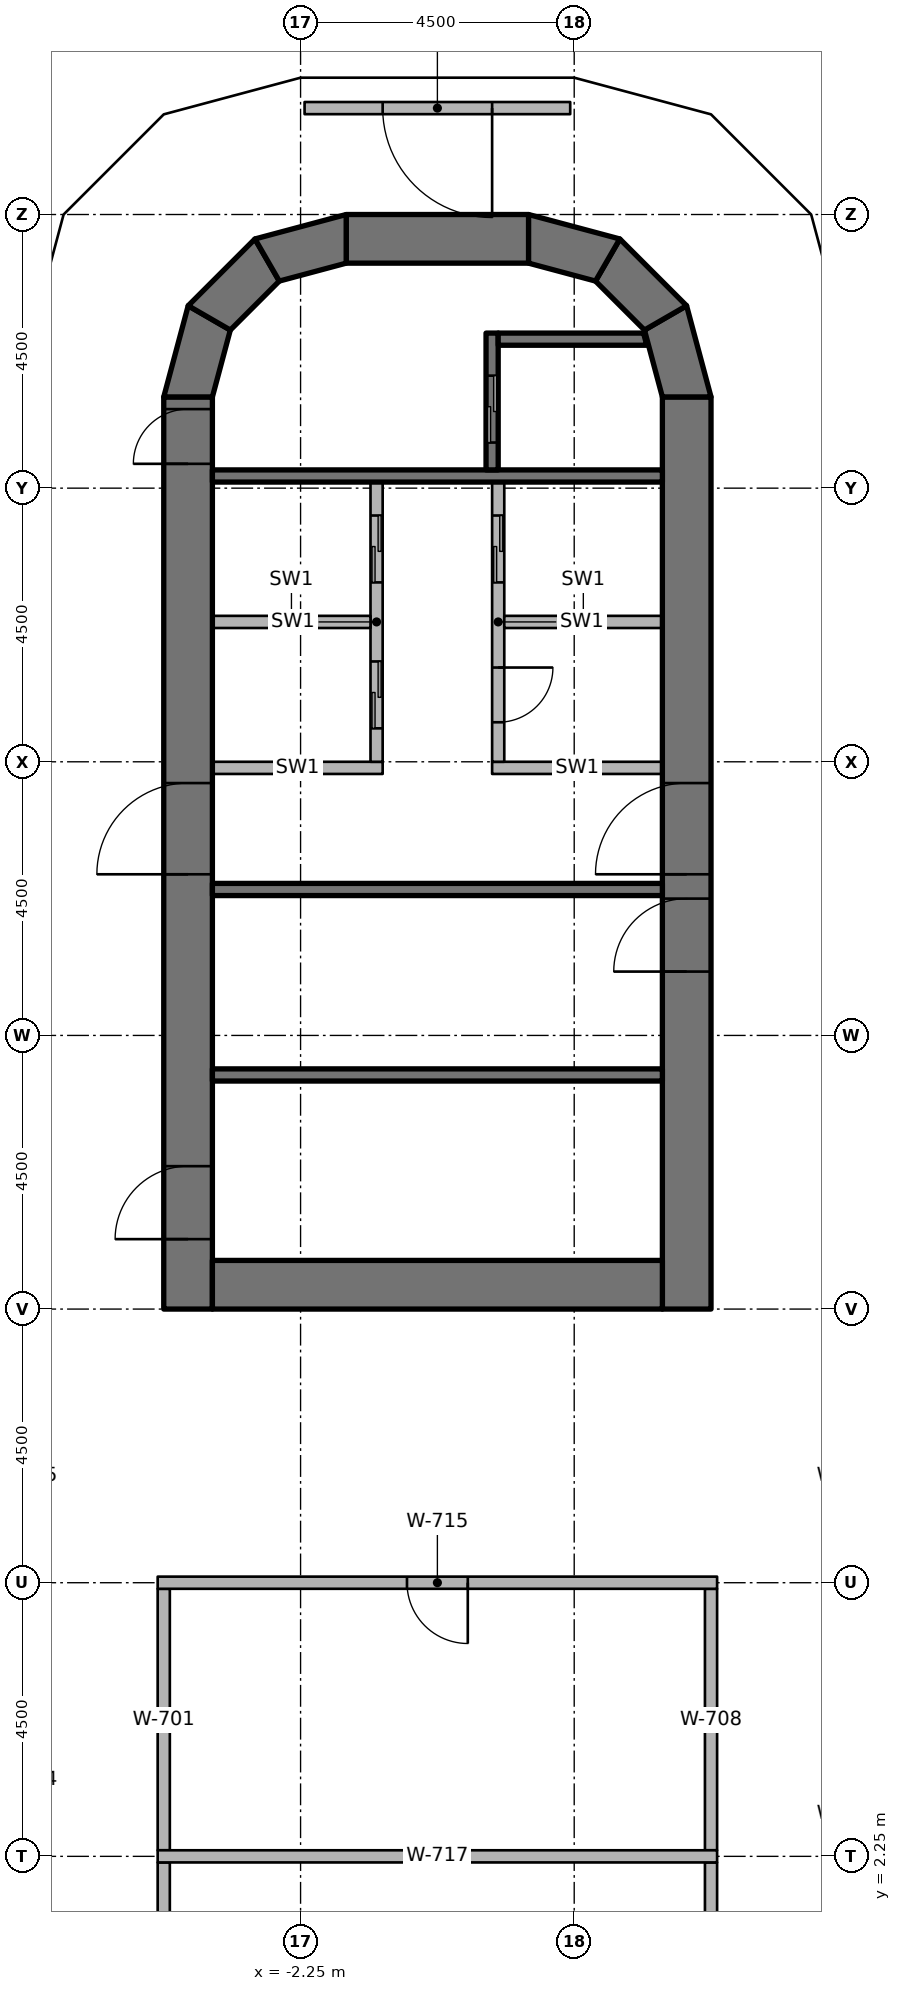
"""IFC4 building model, lengths in metres.
Left out: names, types, materials, properties, quantities, classifications, styles, units other than length and angle.
Written with IfcOpenShell. Run it as: python <this file> out.ifc"""

import sys

from ifc_helpers import new_model, si_unit, direction, frame, frame_2d, origin, origin_2d, place, context, subcontext, project, spatial, polyline, rectangle, outline, extrude, element, fill, save


model = new_model("IFC4")
c1 = context("Model", 3, precision=1e-05, world=origin(), true_north=direction((0.0, 1.0)))
c2 = subcontext(c1, "Body", "Model", "MODEL_VIEW")
j1 = project(units=[si_unit("LENGTHUNIT", "METRE"), si_unit("PLANEANGLEUNIT", "RADIAN")], contexts=[c1])
p1 = place(None, origin())
s1 = spatial("IfcSite", under=j1, at=p1, CompositionType="ELEMENT")
p2 = place(p1, origin())
s2 = spatial("IfcBuilding", under=s1, at=p2, CompositionType="ELEMENT")
p3 = place(p2, frame((0.0, 0.0, 94.2)))
s3 = spatial("IfcBuildingStorey", under=s2, at=p3, CompositionType="ELEMENT", Elevation=94.2)
for number, where, z_axis, x_axis in (
    (1, (-6.25, 6.25, 0.0), (0.0, 0.0, 1.0), (1.0, 0.0, 0.0)),
    (2, (-6.25, 10.75, 0.0), (0.0, 0.0, 1.0), (1.0, 0.0, 0.0)),
    (3, (-6.25, 15.75, 0.0), (0.0, 0.0, 1.0), (1.0, 0.0, 0.0)),
    (4, (-6.25, 20.25, 0.0), (0.0, 0.0, 1.0), (1.0, 0.0, 0.0)),
    (5, (-6.25, 24.65, 0.0), (0.0, 0.0, 1.0), (1.0, 0.0, 0.0)),
    (6, (-6.25, 26.7, 0.0), (0.0, 0.0, 1.0), (1.0, 0.0, 0.0)),
    (7, (6.25, 6.25, 0.0), (0.0, 0.0, 1.0), (1.0, 0.0, 0.0)),
    (8, (6.25, 10.75, 0.0), (0.0, 0.0, 1.0), (1.0, 0.0, 0.0)),
    (9, (6.25, 15.75, 0.0), (0.0, 0.0, 1.0), (1.0, 0.0, 0.0)),
    (10, (6.25, 20.25, 0.0), (0.0, 0.0, 1.0), (1.0, 0.0, 0.0)),
    (11, (6.25, 24.65, 0.0), (0.0, 0.0, 1.0), (1.0, 0.0, 0.0)),
    (12, (6.25, 26.7, 0.0), (0.0, 0.0, 1.0), (1.0, 0.0, 0.0)),
):
    element("IfcColumn", number, at=place(p3, frame(where, z_axis=z_axis, x_axis=x_axis)), inside=s3, PredefinedType="COLUMN", context=c2, shape_type="SweptSolid", body=[
        extrude(rectangle(XDim=0.9, YDim=0.9, at=origin_2d()), origin(), (0.0, 0.0, 1.0), 3.65),
    ])
p4 = place(p3, frame((-4.1, 11.25, 0.0), z_axis=(0.0, 0.0, 1.0), x_axis=(0.0, 1.0, 0.0)))
e13 = element("IfcWall", 13, at=p4, inside=s3, PredefinedType="SHEAR", context=c2, shape_type="SweptSolid", body=[
    extrude(rectangle(XDim=15.0, YDim=0.8, at=frame_2d((7.5, 0.0))), origin(), (0.0, 0.0, 1.0), 3.8),
])
p5 = place(p4, frame((7.15, 0.0, 0.0)))
e14 = element("IfcOpeningElement", 14, at=p5, cuts=e13, PredefinedType="OPENING", context=c2, shape_type="SweptSolid", body=[
    extrude(rectangle(XDim=1.5, YDim=2.3, at=frame_2d((0.75, 1.15))), frame((0.0, 0.41, 0.0), z_axis=(0.0, -1.0, 0.0), x_axis=(1.0, 0.0, 0.0)), (0.0, 0.0, 1.0), 0.82),
])
p6 = place(p4, frame((13.9, 0.0, 0.0)))
e15 = element("IfcOpeningElement", 15, at=p6, cuts=e13, PredefinedType="OPENING", context=c2, shape_type="SweptSolid", body=[
    extrude(rectangle(XDim=0.9, YDim=2.1, at=frame_2d((0.45, 1.05))), frame((0.0, 0.41, 0.0), z_axis=(0.0, -1.0, 0.0), x_axis=(1.0, 0.0, 0.0)), (0.0, 0.0, 1.0), 0.82),
])
p7 = place(p4, frame((1.15, 0.0, 0.0)))
e16 = element("IfcOpeningElement", 16, at=p7, cuts=e13, PredefinedType="OPENING", context=c2, shape_type="SweptSolid", body=[
    extrude(rectangle(XDim=1.2, YDim=2.1, at=frame_2d((0.6, 1.05))), frame((0.0, 0.41, 0.0), z_axis=(0.0, -1.0, 0.0), x_axis=(1.0, 0.0, 0.0)), (0.0, 0.0, 1.0), 0.82),
])
p8 = place(p3, frame((4.1, 11.25, 0.0), z_axis=(0.0, 0.0, 1.0), x_axis=(0.0, 1.0, 0.0)))
e17 = element("IfcWall", 17, at=p8, inside=s3, PredefinedType="SHEAR", context=c2, shape_type="SweptSolid", body=[
    extrude(rectangle(XDim=15.0, YDim=0.8, at=frame_2d((7.5, 0.0))), origin(), (0.0, 0.0, 1.0), 3.8),
])
p9 = place(p8, frame((7.15, 0.0, 0.0)))
e18 = element("IfcOpeningElement", 18, at=p9, cuts=e17, PredefinedType="OPENING", context=c2, shape_type="SweptSolid", body=[
    extrude(rectangle(XDim=1.5, YDim=2.3, at=frame_2d((0.75, 1.15))), frame((0.0, 0.41, 0.0), z_axis=(0.0, -1.0, 0.0), x_axis=(1.0, 0.0, 0.0)), (0.0, 0.0, 1.0), 0.82),
])
p10 = place(p8, frame((5.55, 0.0, 0.0)))
e19 = element("IfcOpeningElement", 19, at=p10, cuts=e17, PredefinedType="OPENING", context=c2, shape_type="SweptSolid", body=[
    extrude(rectangle(XDim=1.2, YDim=2.1, at=frame_2d((0.6, 1.05))), frame((0.0, 0.41, 0.0), z_axis=(0.0, -1.0, 0.0), x_axis=(1.0, 0.0, 0.0)), (0.0, 0.0, 1.0), 0.82),
])
p11 = place(p3, frame((-3.7, 11.65, 0.0), z_axis=(0.0, 0.0, 1.0), x_axis=(1.0, 0.0, 0.0)))
e20 = element("IfcWall", 20, at=p11, inside=s3, PredefinedType="SHEAR", context=c2, shape_type="SweptSolid", body=[
    extrude(rectangle(XDim=7.4, YDim=0.8, at=frame_2d((3.7, 0.0))), origin(), (0.0, 0.0, 1.0), 3.8),
])
p12 = place(p3, frame((-1.5, 28.85, 0.0), z_axis=(0.0, 0.0, 1.0), x_axis=(1.0, 0.0, 0.0)))
e21 = element("IfcWall", 21, at=p12, inside=s3, PredefinedType="SHEAR", context=c2, shape_type="SweptSolid", body=[
    extrude(rectangle(XDim=3.0, YDim=0.8, at=frame_2d((1.5, 0.0))), origin(), (0.0, 0.0, 1.0), 3.8),
])
p13 = place(p3, origin())
e22 = element("IfcWall", 22, at=p13, inside=s3, PredefinedType="SHEAR", context=c2, shape_type="SweptSolid", body=[
    extrude(outline(polyline([(-4.5, 26.25), (-4.098, 27.75), (-3.405, 27.35), (-3.7, 26.25), (-4.5, 26.25)])), origin(), (0.0, 0.0, 1.0), 3.8),
])
p14 = place(p3, origin())
e23 = element("IfcWall", 23, at=p14, inside=s3, PredefinedType="SHEAR", context=c2, shape_type="SweptSolid", body=[
    extrude(outline(polyline([(-4.098, 27.75), (-3.0, 28.848), (-2.6, 28.155), (-3.405, 27.35), (-4.098, 27.75)])), origin(), (0.0, 0.0, 1.0), 3.8),
])
p15 = place(p3, origin())
e24 = element("IfcWall", 24, at=p15, inside=s3, PredefinedType="SHEAR", context=c2, shape_type="SweptSolid", body=[
    extrude(outline(polyline([(-3.0, 28.848), (-1.5, 29.25), (-1.5, 28.45), (-2.6, 28.155), (-3.0, 28.848)])), origin(), (0.0, 0.0, 1.0), 3.8),
])
p16 = place(p3, origin())
e25 = element("IfcWall", 25, at=p16, inside=s3, PredefinedType="SHEAR", context=c2, shape_type="SweptSolid", body=[
    extrude(outline(polyline([(4.5, 26.25), (4.098, 27.75), (3.405, 27.35), (3.7, 26.25), (4.5, 26.25)])), origin(), (0.0, 0.0, 1.0), 3.8),
])
p17 = place(p3, origin())
e26 = element("IfcWall", 26, at=p17, inside=s3, PredefinedType="SHEAR", context=c2, shape_type="SweptSolid", body=[
    extrude(outline(polyline([(4.098, 27.75), (3.0, 28.848), (2.6, 28.155), (3.405, 27.35), (4.098, 27.75)])), origin(), (0.0, 0.0, 1.0), 3.8),
])
p18 = place(p3, origin())
e27 = element("IfcWall", 27, at=p18, inside=s3, PredefinedType="SHEAR", context=c2, shape_type="SweptSolid", body=[
    extrude(outline(polyline([(3.0, 28.848), (1.5, 29.25), (1.5, 28.45), (2.6, 28.155), (3.0, 28.848)])), origin(), (0.0, 0.0, 1.0), 3.8),
])
p19 = place(p3, frame((2.184, 31.0, 0.0), z_axis=(0.0, 0.0, 1.0), x_axis=(-1.0, 0.0, 0.0)))
e28 = element("IfcWall", 28, at=p19, inside=s3, PredefinedType="SOLIDWALL", context=c2, shape_type="SweptSolid", body=[
    extrude(rectangle(XDim=4.368, YDim=0.2, at=frame_2d((2.184, 0.0))), origin(), (0.0, 0.0, 1.0), 2.75),
])
p20 = place(p19, frame((1.284, 0.0, 0.0)))
e29 = element("IfcOpeningElement", 29, at=p20, cuts=e28, PredefinedType="OPENING", context=c2, shape_type="SweptSolid", body=[
    extrude(rectangle(XDim=1.8, YDim=2.4, at=frame_2d((0.9, 1.2))), frame((0.0, 0.11, 0.0), z_axis=(0.0, -1.0, 0.0), x_axis=(1.0, 0.0, 0.0)), (0.0, 0.0, 1.0), 0.22),
])
p21 = place(p3, frame((-3.7, 24.95, 0.0), z_axis=(0.0, 0.0, 1.0), x_axis=(1.0, 0.0, 0.0)))
e30 = element("IfcWall", 30, at=p21, inside=s3, PredefinedType="SHEAR", context=c2, shape_type="SweptSolid", body=[
    extrude(rectangle(XDim=7.4, YDim=0.2, at=frame_2d((3.7, 0.0))), origin(), (0.0, 0.0, 1.0), 3.65),
])
p22 = place(p3, frame((0.9, 27.3, 0.0), z_axis=(0.0, 0.0, 1.0), x_axis=(0.0, -1.0, 0.0)))
e31 = element("IfcWall", 31, at=p22, inside=s3, PredefinedType="SHEAR", context=c2, shape_type="SweptSolid", body=[
    extrude(rectangle(XDim=2.25, YDim=0.2, at=frame_2d((1.125, 0.0))), origin(), (0.0, 0.0, 1.0), 3.65),
])
p23 = place(p22, frame((0.7, 0.0, 0.0)))
e32 = element("IfcOpeningElement", 32, at=p23, cuts=e31, PredefinedType="OPENING", context=c2, shape_type="SweptSolid", body=[
    extrude(rectangle(XDim=1.1, YDim=2.3, at=frame_2d((0.55, 1.15))), frame((0.0, 0.11, 0.0), z_axis=(0.0, -1.0, 0.0), x_axis=(1.0, 0.0, 0.0)), (0.0, 0.0, 1.0), 0.22),
])
p24 = place(p3, origin())
e33 = element("IfcWall", 33, at=p24, inside=s3, PredefinedType="SHEAR", context=c2, shape_type="SweptSolid", body=[
    extrude(outline(polyline([(1.0, 27.1), (3.444, 27.1), (3.39, 27.3), (1.0, 27.3), (1.0, 27.1)])), origin(), (0.0, 0.0, 1.0), 3.65),
])
for number, where, z_axis, x_axis in (
    (34, (-3.7, 18.15, 0.0), (0.0, 0.0, 1.0), (1.0, 0.0, 0.0)),
    (35, (-3.7, 15.1, 0.0), (0.0, 0.0, 1.0), (1.0, 0.0, 0.0)),
):
    element("IfcWall", number, at=place(p3, frame(where, z_axis=z_axis, x_axis=x_axis)), inside=s3, PredefinedType="SHEAR", context=c2, shape_type="SweptSolid", body=[
        extrude(rectangle(XDim=7.4, YDim=0.2, at=frame_2d((3.7, 0.0))), origin(), (0.0, 0.0, 1.0), 3.65),
    ])
p25 = place(p3, frame((-3.7, 20.15, 0.0), z_axis=(0.0, 0.0, 1.0), x_axis=(1.0, 0.0, 0.0)))
e36 = element("IfcWall", 36, at=p25, inside=s3, PredefinedType="PARTITIONING", context=c2, shape_type="SweptSolid", body=[
    extrude(rectangle(XDim=2.8, YDim=0.2, at=frame_2d((1.4, 0.0))), origin(), (0.0, 0.0, 1.0), 3.65),
])
p26 = place(p3, frame((-1.0, 24.85, 0.0), z_axis=(0.0, 0.0, 1.0), x_axis=(0.0, -1.0, 0.0)))
e37 = element("IfcWall", 37, at=p26, inside=s3, PredefinedType="PARTITIONING", context=c2, shape_type="SweptSolid", body=[
    extrude(rectangle(XDim=4.6, YDim=0.2, at=frame_2d((2.3, 0.0))), origin(), (0.0, 0.0, 1.0), 3.65),
])
p27 = place(p26, frame((0.55, 0.0, 0.0)))
e38 = element("IfcOpeningElement", 38, at=p27, cuts=e37, PredefinedType="OPENING", context=c2, shape_type="SweptSolid", body=[
    extrude(rectangle(XDim=1.1, YDim=2.3, at=frame_2d((0.55, 1.15))), frame((0.0, 0.11, 0.0), z_axis=(0.0, -1.0, 0.0), x_axis=(1.0, 0.0, 0.0)), (0.0, 0.0, 1.0), 0.22),
])
p28 = place(p26, frame((2.95, 0.0, 0.0)))
e39 = element("IfcOpeningElement", 39, at=p28, cuts=e37, PredefinedType="OPENING", context=c2, shape_type="SweptSolid", body=[
    extrude(rectangle(XDim=1.1, YDim=2.3, at=frame_2d((0.55, 1.15))), frame((0.0, 0.11, 0.0), z_axis=(0.0, -1.0, 0.0), x_axis=(1.0, 0.0, 0.0)), (0.0, 0.0, 1.0), 0.22),
])
p29 = place(p3, frame((0.9, 20.15, 0.0), z_axis=(0.0, 0.0, 1.0), x_axis=(1.0, 0.0, 0.0)))
e40 = element("IfcWall", 40, at=p29, inside=s3, PredefinedType="PARTITIONING", context=c2, shape_type="SweptSolid", body=[
    extrude(rectangle(XDim=2.8, YDim=0.2, at=frame_2d((1.4, 0.0))), origin(), (0.0, 0.0, 1.0), 3.65),
])
p30 = place(p3, frame((1.0, 24.85, 0.0), z_axis=(0.0, 0.0, 1.0), x_axis=(0.0, -1.0, 0.0)))
e41 = element("IfcWall", 41, at=p30, inside=s3, PredefinedType="PARTITIONING", context=c2, shape_type="SweptSolid", body=[
    extrude(rectangle(XDim=4.6, YDim=0.2, at=frame_2d((2.3, 0.0))), origin(), (0.0, 0.0, 1.0), 3.65),
])
p31 = place(p30, frame((0.55, 0.0, 0.0)))
e42 = element("IfcOpeningElement", 42, at=p31, cuts=e41, PredefinedType="OPENING", context=c2, shape_type="SweptSolid", body=[
    extrude(rectangle(XDim=1.1, YDim=2.3, at=frame_2d((0.55, 1.15))), frame((0.0, 0.11, 0.0), z_axis=(0.0, -1.0, 0.0), x_axis=(1.0, 0.0, 0.0)), (0.0, 0.0, 1.0), 0.22),
])
p32 = place(p30, frame((3.05, 0.0, 0.0)))
e43 = element("IfcOpeningElement", 43, at=p32, cuts=e41, PredefinedType="OPENING", context=c2, shape_type="SweptSolid", body=[
    extrude(rectangle(XDim=0.9, YDim=2.1, at=frame_2d((0.45, 1.05))), frame((0.0, 0.11, 0.0), z_axis=(0.0, -1.0, 0.0), x_axis=(1.0, 0.0, 0.0)), (0.0, 0.0, 1.0), 0.22),
])
for number, where, z_axis, x_axis in (
    (44, (-3.7, 22.55, 0.0), (0.0, 0.0, 1.0), (1.0, 0.0, 0.0)),
    (45, (1.1, 22.55, 0.0), (0.0, 0.0, 1.0), (1.0, 0.0, 0.0)),
):
    element("IfcWall", number, at=place(p3, frame(where, z_axis=z_axis, x_axis=x_axis)), inside=s3, PredefinedType="PARTITIONING", context=c2, shape_type="SweptSolid", body=[
        extrude(rectangle(XDim=2.6, YDim=0.2, at=frame_2d((1.3, 0.0))), origin(), (0.0, 0.0, 1.0), 3.65),
    ])
for number, where, z_axis, x_axis in (
    (46, (-4.5, 2.35, 0.0), (0.0, 0.0, 1.0), (0.0, 1.0, 0.0)),
    (47, (-4.5, -2.15, 0.0), (0.0, 0.0, 1.0), (0.0, 1.0, 0.0)),
    (48, (4.5, 2.35, 0.0), (0.0, 0.0, 1.0), (0.0, 1.0, 0.0)),
):
    element("IfcWall", number, at=place(p3, frame(where, z_axis=z_axis, x_axis=x_axis)), inside=s3, PredefinedType="PARTITIONING", context=c2, shape_type="SweptSolid", body=[
        extrude(rectangle(XDim=4.3, YDim=0.2, at=frame_2d((2.15, 0.0))), origin(), (0.0, 0.0, 1.0), 2.738),
    ])
p33 = place(p3, frame((4.5, -2.15, 0.0), z_axis=(0.0, 0.0, 1.0), x_axis=(0.0, 1.0, 0.0)))
e49 = element("IfcWall", 49, at=p33, inside=s3, PredefinedType="PARTITIONING", context=c2, shape_type="SweptSolid", body=[
    extrude(rectangle(XDim=4.3, YDim=0.2, at=frame_2d((2.15, 0.0))), origin(), (0.0, 0.0, 1.0), 2.738),
])
p34 = place(p33, frame((1.65, 0.0, 0.0)))
e50 = element("IfcOpeningElement", 50, at=p34, cuts=e49, PredefinedType="OPENING", context=c2, shape_type="SweptSolid", body=[
    extrude(rectangle(XDim=1.0, YDim=2.1, at=frame_2d((0.5, 1.05))), frame((0.0, 0.11, 0.0), z_axis=(0.0, -1.0, 0.0), x_axis=(1.0, 0.0, 0.0)), (0.0, 0.0, 1.0), 0.22),
])
p35 = place(p3, frame((4.6, 6.75, 0.0), z_axis=(0.0, 0.0, 1.0), x_axis=(-1.0, 0.0, 0.0)))
e51 = element("IfcWall", 51, at=p35, inside=s3, PredefinedType="PARTITIONING", context=c2, shape_type="SweptSolid", body=[
    extrude(rectangle(XDim=9.2, YDim=0.2, at=frame_2d((4.6, 0.0))), origin(), (0.0, 0.0, 1.0), 2.738),
])
p36 = place(p35, frame((4.1, 0.0, 0.0)))
e52 = element("IfcOpeningElement", 52, at=p36, cuts=e51, PredefinedType="OPENING", context=c2, shape_type="SweptSolid", body=[
    extrude(rectangle(XDim=1.0, YDim=2.1, at=frame_2d((0.5, 1.05))), frame((0.0, 0.11, 0.0), z_axis=(0.0, -1.0, 0.0), x_axis=(1.0, 0.0, 0.0)), (0.0, 0.0, 1.0), 0.22),
])
p37 = place(p3, frame((-4.6, 2.25, 0.0), z_axis=(0.0, 0.0, 1.0), x_axis=(1.0, 0.0, 0.0)))
e53 = element("IfcWall", 53, at=p37, inside=s3, PredefinedType="PARTITIONING", context=c2, shape_type="SweptSolid", body=[
    extrude(rectangle(XDim=9.2, YDim=0.2, at=frame_2d((4.6, 0.0))), origin(), (0.0, 0.0, 1.0), 2.738),
])
p38 = place(p20, origin())
e54 = element("IfcDoor", 54, at=p38, inside=s3, OperationType="SINGLE_SWING_LEFT", PredefinedType="DOOR", context=c2, shape_type="SweptSolid", body=[
    extrude(rectangle(XDim=1.8, YDim=2.4, at=frame_2d((0.9, 1.2))), frame((0.0, 0.025, 0.0), z_axis=(0.0, -1.0, 0.0), x_axis=(1.0, 0.0, 0.0)), (0.0, 0.0, 1.0), 0.05),
])
fill(e29, e54)
p39 = place(p5, origin())
e55 = element("IfcDoor", 55, at=p39, inside=s3, OperationType="DOUBLE_DOOR_SINGLE_SWING", PredefinedType="DOOR", context=c2, shape_type="SweptSolid", body=[
    extrude(rectangle(XDim=1.5, YDim=2.3, at=frame_2d((0.75, 1.15))), frame((0.0, 0.025, 0.0), z_axis=(0.0, -1.0, 0.0), x_axis=(1.0, 0.0, 0.0)), (0.0, 0.0, 1.0), 0.05),
])
fill(e14, e55)
p40 = place(p9, origin())
e56 = element("IfcDoor", 56, at=p40, inside=s3, OperationType="DOUBLE_DOOR_SINGLE_SWING", PredefinedType="DOOR", context=c2, shape_type="SweptSolid", body=[
    extrude(rectangle(XDim=1.5, YDim=2.3, at=frame_2d((0.75, 1.15))), frame((0.0, 0.025, 0.0), z_axis=(0.0, -1.0, 0.0), x_axis=(1.0, 0.0, 0.0)), (0.0, 0.0, 1.0), 0.05),
])
fill(e18, e56)
p41 = place(p6, origin())
e57 = element("IfcDoor", 57, at=p41, inside=s3, OperationType="SINGLE_SWING_RIGHT", PredefinedType="DOOR", context=c2, shape_type="SweptSolid", body=[
    extrude(rectangle(XDim=0.9, YDim=2.1, at=frame_2d((0.45, 1.05))), frame((0.0, 0.025, 0.0), z_axis=(0.0, -1.0, 0.0), x_axis=(1.0, 0.0, 0.0)), (0.0, 0.0, 1.0), 0.05),
])
fill(e15, e57)
p42 = place(p10, origin())
e58 = element("IfcDoor", 58, at=p42, inside=s3, OperationType="SINGLE_SWING_LEFT", PredefinedType="DOOR", context=c2, shape_type="SweptSolid", body=[
    extrude(rectangle(XDim=1.2, YDim=2.1, at=frame_2d((0.6, 1.05))), frame((0.0, 0.025, 0.0), z_axis=(0.0, -1.0, 0.0), x_axis=(1.0, 0.0, 0.0)), (0.0, 0.0, 1.0), 0.05),
])
fill(e19, e58)
p43 = place(p7, origin())
e59 = element("IfcDoor", 59, at=p43, inside=s3, OperationType="SINGLE_SWING_RIGHT", PredefinedType="DOOR", context=c2, shape_type="SweptSolid", body=[
    extrude(rectangle(XDim=1.2, YDim=2.1, at=frame_2d((0.6, 1.05))), frame((0.0, 0.025, 0.0), z_axis=(0.0, -1.0, 0.0), x_axis=(1.0, 0.0, 0.0)), (0.0, 0.0, 1.0), 0.05),
])
fill(e16, e59)
p44 = place(p23, origin())
e60 = element("IfcDoor", 60, at=p44, inside=s3, OperationType="DOUBLE_DOOR_SLIDING", PredefinedType="DOOR", context=c2, shape_type="SweptSolid", body=[
    extrude(rectangle(XDim=1.1, YDim=2.3, at=frame_2d((0.55, 1.15))), frame((0.0, 0.025, 0.0), z_axis=(0.0, -1.0, 0.0), x_axis=(1.0, 0.0, 0.0)), (0.0, 0.0, 1.0), 0.05),
])
fill(e32, e60)
p45 = place(p27, origin())
e61 = element("IfcDoor", 61, at=p45, inside=s3, OperationType="DOUBLE_DOOR_SLIDING", PredefinedType="DOOR", context=c2, shape_type="SweptSolid", body=[
    extrude(rectangle(XDim=1.1, YDim=2.3, at=frame_2d((0.55, 1.15))), frame((0.0, 0.025, 0.0), z_axis=(0.0, -1.0, 0.0), x_axis=(1.0, 0.0, 0.0)), (0.0, 0.0, 1.0), 0.05),
])
fill(e38, e61)
p46 = place(p28, origin())
e62 = element("IfcDoor", 62, at=p46, inside=s3, OperationType="DOUBLE_DOOR_SLIDING", PredefinedType="DOOR", context=c2, shape_type="SweptSolid", body=[
    extrude(rectangle(XDim=1.1, YDim=2.3, at=frame_2d((0.55, 1.15))), frame((0.0, 0.025, 0.0), z_axis=(0.0, -1.0, 0.0), x_axis=(1.0, 0.0, 0.0)), (0.0, 0.0, 1.0), 0.05),
])
fill(e39, e62)
p47 = place(p31, origin())
e63 = element("IfcDoor", 63, at=p47, inside=s3, OperationType="DOUBLE_DOOR_SLIDING", PredefinedType="DOOR", context=c2, shape_type="SweptSolid", body=[
    extrude(rectangle(XDim=1.1, YDim=2.3, at=frame_2d((0.55, 1.15))), frame((0.0, 0.025, 0.0), z_axis=(0.0, -1.0, 0.0), x_axis=(1.0, 0.0, 0.0)), (0.0, 0.0, 1.0), 0.05),
])
fill(e42, e63)
p48 = place(p32, origin())
e64 = element("IfcDoor", 64, at=p48, inside=s3, OperationType="SINGLE_SWING_RIGHT", PredefinedType="DOOR", context=c2, shape_type="SweptSolid", body=[
    extrude(rectangle(XDim=0.9, YDim=2.1, at=frame_2d((0.45, 1.05))), frame((0.0, 0.025, 0.0), z_axis=(0.0, -1.0, 0.0), x_axis=(1.0, 0.0, 0.0)), (0.0, 0.0, 1.0), 0.05),
])
fill(e43, e64)
p49 = place(p36, origin())
e65 = element("IfcDoor", 65, at=p49, inside=s3, OperationType="SINGLE_SWING_RIGHT", PredefinedType="DOOR", context=c2, shape_type="SweptSolid", body=[
    extrude(rectangle(XDim=1.0, YDim=2.1, at=frame_2d((0.5, 1.05))), frame((0.0, 0.025, 0.0), z_axis=(0.0, -1.0, 0.0), x_axis=(1.0, 0.0, 0.0)), (0.0, 0.0, 1.0), 0.05),
])
fill(e52, e65)
save(model, sys.argv[1])
